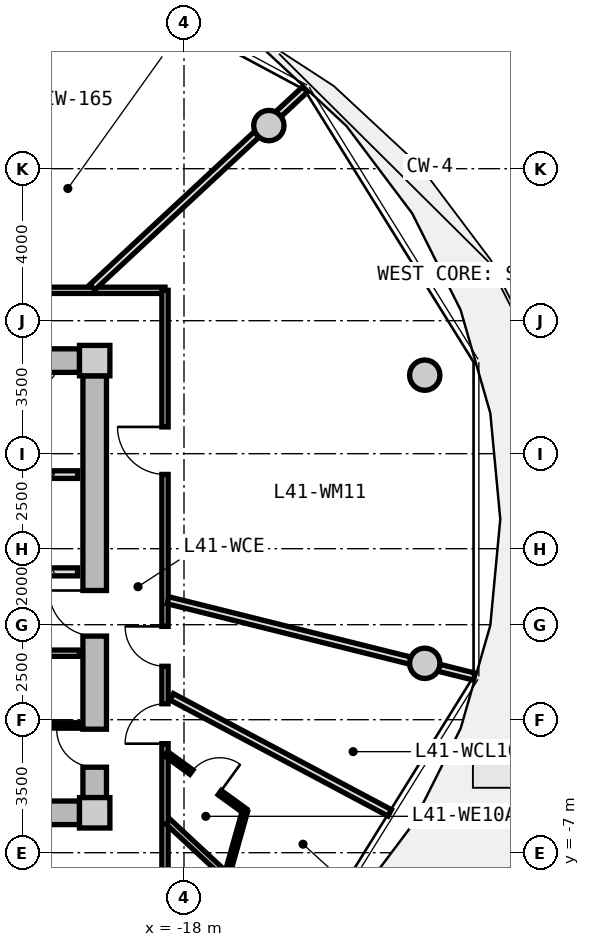
"""IFC4 building model, lengths in metres.
Left out: names, types, materials, properties, quantities, classifications, styles, units other than length and angle.
Written with IfcOpenShell. Run it as: python <this file> out.ifc"""

import sys

from ifc_helpers import new_model, si_unit, direction, frame, frame_2d, origin, origin_2d, place, context, subcontext, project, spatial, rectangle, circle, extrude, source, transform, mapped, element, fill, save


model = new_model("IFC4")
c1 = context("Model", 3, precision=1e-05, world=origin(), true_north=direction((0.0, 1.0)))
c2 = subcontext(c1, "Body", "Model", "MODEL_VIEW")
j1 = project(units=[si_unit("LENGTHUNIT", "METRE"), si_unit("PLANEANGLEUNIT", "RADIAN")], contexts=[c1])
p1 = place(None, origin())
s1 = spatial("IfcSite", under=j1, at=p1, CompositionType="ELEMENT")
p2 = place(p1, origin())
s2 = spatial("IfcBuilding", under=s1, at=p2, CompositionType="ELEMENT")
p3 = place(p2, frame((0.0, 0.0, 134.3)))
s3 = spatial("IfcBuildingStorey", under=s2, at=p3, CompositionType="ELEMENT", Elevation=134.3)
m1 = source(origin(), c2, "Body", "SweptSolid", [
    extrude(rectangle(XDim=0.8, YDim=0.8, at=origin_2d()), origin(), (0.0, 0.0, 1.0), 3.05),
])
for number, where, z_axis, x_axis in (
    (1, (-20.35, -5.95, 0.0), (0.0, 0.0, 1.0), (1.0, 0.0, 0.0)),
    (2, (-20.35, 5.95, 0.0), (0.0, 0.0, 1.0), (1.0, 0.0, 0.0)),
):
    element("IfcColumn", number, at=place(p3, frame(where, z_axis=z_axis, x_axis=x_axis)), inside=s3, PredefinedType="COLUMN", context=c2, shape_type="MappedRepresentation", body=[
        mapped(m1, transform((0.0, 0.0, 0.0), x_axis=(1.0, 0.0, 0.0), y_axis=(0.0, 1.0, 0.0), z_axis=(0.0, 0.0, 1.0), scale=1.0)),
    ])
m2 = source(origin(), c2, "Body", "SweptSolid", [
    extrude(rectangle(XDim=14.5, YDim=0.62, at=frame_2d((7.25, 0.0))), origin(), (0.0, 0.0, 1.0), 2.81),
])
for number, where, z_axis, x_axis in (
    (3, (-35.25, 5.95, 0.0), (0.0, 0.0, 1.0), (1.0, 0.0, 0.0)),
    (4, (-20.75, -5.95, 0.0), (0.0, 0.0, 1.0), (-1.0, 0.0, 0.0)),
):
    element("IfcWall", number, at=place(p3, frame(where, z_axis=z_axis, x_axis=x_axis)), inside=s3, PredefinedType="SHEAR", context=c2, shape_type="MappedRepresentation", body=[
        mapped(m2, transform((0.0, 0.0, 0.0), x_axis=(1.0, 0.0, 0.0), y_axis=(0.0, 1.0, 0.0), z_axis=(0.0, 0.0, 1.0), scale=1.0)),
    ])
m3 = source(origin(), c2, "Body", "SweptSolid", [
    extrude(rectangle(XDim=11.1, YDim=0.62, at=frame_2d((5.55, 0.0))), origin(), (0.0, 0.0, 1.0), 2.81),
])
p4 = place(p3, frame((-20.35, 5.55, 0.0), z_axis=(0.0, 0.0, 1.0), x_axis=(0.0, -1.0, 0.0)))
e5 = element("IfcWall", 5, at=p4, inside=s3, PredefinedType="SHEAR", context=c2, shape_type="MappedRepresentation", body=[
    mapped(m3, transform((0.0, 0.0, 0.0), x_axis=(1.0, 0.0, 0.0), y_axis=(0.0, 1.0, 0.0), z_axis=(0.0, 0.0, 1.0), scale=1.0)),
])
p5 = place(p4, frame((5.65, 0.0, 0.0)))
e6 = element("IfcOpeningElement", 6, at=p5, cuts=e5, PredefinedType="OPENING", context=c2, shape_type="SweptSolid", body=[
    extrude(rectangle(XDim=1.2, YDim=2.15, at=frame_2d((0.6, 1.075))), frame((0.0, 0.32, 0.0), z_axis=(0.0, -1.0, 0.0), x_axis=(1.0, 0.0, 0.0)), (0.0, 0.0, 1.0), 0.64),
])
p6 = place(p4, frame((9.3, 0.0, 0.0)))
e7 = element("IfcOpeningElement", 7, at=p6, cuts=e5, PredefinedType="OPENING", context=c2, shape_type="SweptSolid", body=[
    extrude(rectangle(XDim=1.0, YDim=2.1, at=frame_2d((0.5, 1.05))), frame((0.0, 0.32, 0.0), z_axis=(0.0, -1.0, 0.0), x_axis=(1.0, 0.0, 0.0)), (0.0, 0.0, 1.0), 0.64),
])
m4 = source(origin(), c2, "Body", "SweptSolid", [
    extrude(circle(Radius=0.4, at=origin_2d()), origin(), (0.0, 0.0, 1.0), 3.47),
])
for number, where, z_axis, x_axis in (
    (8, (-11.665, 5.567, -0.42), (0.0, 0.0, 1.0), (1.0, 0.0, 0.0)),
    (9, (-15.767, 12.135, -0.42), (0.0, 0.0, 1.0), (1.0, 0.0, 0.0)),
    (10, (-11.665, -2.016, -0.42), (0.0, 0.0, 1.0), (1.0, 0.0, 0.0)),
):
    element("IfcColumn", number, at=place(p3, frame(where, z_axis=z_axis, x_axis=x_axis)), inside=s3, PredefinedType="COLUMN", context=c2, shape_type="MappedRepresentation", body=[
        mapped(m4, transform((0.0, 0.0, 0.0), x_axis=(1.0, 0.0, 0.0), y_axis=(0.0, 1.0, 0.0), z_axis=(0.0, 0.0, 1.0), scale=1.0)),
    ])
m5 = source(origin(), c2, "Body", "SweptSolid", [
    extrude(rectangle(XDim=3.2, YDim=0.2, at=frame_2d((1.6, 0.0))), origin(), (0.0, 0.0, 1.0), 2.795),
])
p7 = place(p3, frame((-24.0, 2.95, 0.0), z_axis=(0.0, 0.0, 1.0), x_axis=(1.0, 0.0, 0.0)))
e11 = element("IfcWall", 11, at=p7, inside=s3, PredefinedType="PARTITIONING", context=c2, shape_type="MappedRepresentation", body=[
    mapped(m5, transform((0.0, 0.0, 0.0), x_axis=(1.0, 0.0, 0.0), y_axis=(0.0, 1.0, 0.0), z_axis=(0.0, 0.0, 1.0), scale=1.0)),
])
m6 = source(origin(), c2, "Body", "SweptSolid", [
    extrude(rectangle(XDim=6.66, YDim=0.21, at=frame_2d((3.33, 0.0))), origin(), (0.0, 0.0, 1.0), 2.795),
])
p8 = place(p3, frame((-27.46, 0.39, 0.0), z_axis=(0.0, 0.0, 1.0), x_axis=(1.0, 0.0, 0.0)))
e12 = element("IfcWall", 12, at=p8, inside=s3, PredefinedType="PARTITIONING", context=c2, shape_type="MappedRepresentation", body=[
    mapped(m6, transform((0.0, 0.0, 0.0), x_axis=(1.0, 0.0, 0.0), y_axis=(0.0, 1.0, 0.0), z_axis=(0.0, 0.0, 1.0), scale=1.0)),
])
p9 = place(p8, frame((1.0, 0.0, 0.0)))
e13 = element("IfcOpeningElement", 13, at=p9, cuts=e12, PredefinedType="OPENING", context=c2, shape_type="SweptSolid", body=[
    extrude(rectangle(XDim=1.2, YDim=2.15, at=frame_2d((0.6, 1.075))), frame((0.0, 0.115, 0.0), z_axis=(0.0, -1.0, 0.0), x_axis=(1.0, 0.0, 0.0)), (0.0, 0.0, 1.0), 0.23),
])
m7 = source(origin(), c2, "Body", "SweptSolid", [
    extrude(rectangle(XDim=2.7, YDim=0.165, at=frame_2d((1.35, 0.0))), origin(), (0.0, 0.0, 1.0), 2.795),
])
p10 = place(p3, frame((-23.45, -1.75, 0.0), z_axis=(0.0, 0.0, 1.0), x_axis=(1.0, 0.0, 0.0)))
e14 = element("IfcWall", 14, at=p10, inside=s3, PredefinedType="PARTITIONING", context=c2, shape_type="MappedRepresentation", body=[
    mapped(m7, transform((0.0, 0.0, 0.0), x_axis=(1.0, 0.0, 0.0), y_axis=(0.0, 1.0, 0.0), z_axis=(0.0, 0.0, 1.0), scale=1.0)),
])
p11 = place(p10, frame((0.85, 0.0, 0.0)))
e15 = element("IfcOpeningElement", 15, at=p11, cuts=e14, PredefinedType="OPENING", context=c2, shape_type="SweptSolid", body=[
    extrude(rectangle(XDim=0.925, YDim=2.1, at=frame_2d((0.462, 1.05))), frame((0.0, 0.093, 0.0), z_axis=(0.0, -1.0, 0.0), x_axis=(1.0, 0.0, 0.0)), (0.0, 0.0, 1.0), 0.185),
])
m8 = source(origin(), c2, "Body", "SweptSolid", [
    extrude(rectangle(XDim=2.7, YDim=0.14, at=frame_2d((1.35, 0.0))), origin(), (0.0, 0.0, 1.0), 2.795),
])
p12 = place(p3, frame((-23.45, -3.65, 0.0), z_axis=(0.0, 0.0, 1.0), x_axis=(1.0, 0.0, 0.0)))
e16 = element("IfcWall", 16, at=p12, inside=s3, PredefinedType="PARTITIONING", context=c2, shape_type="MappedRepresentation", body=[
    mapped(m8, transform((0.0, 0.0, 0.0), x_axis=(1.0, 0.0, 0.0), y_axis=(0.0, 1.0, 0.0), z_axis=(0.0, 0.0, 1.0), scale=1.0)),
])
m9 = source(origin(), c2, "Body", "SweptSolid", [
    extrude(rectangle(XDim=8.6, YDim=0.165, at=frame_2d((4.3, 0.0))), origin(), (0.0, 0.0, 1.0), 2.795),
])
p13 = place(p3, frame((-27.1, 7.8, 0.0), z_axis=(0.0, 0.0, 1.0), x_axis=(1.0, 0.0, 0.0)))
e17 = element("IfcWall", 17, at=p13, inside=s3, PredefinedType="PARTITIONING", context=c2, shape_type="MappedRepresentation", body=[
    mapped(m9, transform((0.0, 0.0, 0.0), x_axis=(1.0, 0.0, 0.0), y_axis=(0.0, 1.0, 0.0), z_axis=(0.0, 0.0, 1.0), scale=1.0)),
])
p14 = place(p13, frame((3.688, 0.0, 0.0)))
e18 = element("IfcOpeningElement", 18, at=p14, cuts=e17, PredefinedType="OPENING", context=c2, shape_type="SweptSolid", body=[
    extrude(rectangle(XDim=1.25, YDim=2.2, at=frame_2d((0.625, 1.1))), frame((0.0, 0.093, 0.0), z_axis=(0.0, -1.0, 0.0), x_axis=(1.0, 0.0, 0.0)), (0.0, 0.0, 1.0), 0.185),
])
m10 = source(origin(), c2, "Body", "SweptSolid", [
    extrude(rectangle(XDim=15.6, YDim=0.165, at=frame_2d((7.8, 0.0))), origin(), (0.0, 0.0, 1.0), 2.795),
])
p15 = place(p3, frame((-18.5, 7.8, 0.0), z_axis=(0.0, 0.0, 1.0), x_axis=(0.0, -1.0, 0.0)))
e19 = element("IfcWall", 19, at=p15, inside=s3, PredefinedType="PARTITIONING", context=c2, shape_type="MappedRepresentation", body=[
    mapped(m10, transform((0.0, 0.0, 0.0), x_axis=(1.0, 0.0, 0.0), y_axis=(0.0, 1.0, 0.0), z_axis=(0.0, 0.0, 1.0), scale=1.0)),
])
p16 = place(p15, frame((10.881, 0.0, 0.0)))
e20 = element("IfcOpeningElement", 20, at=p16, cuts=e19, PredefinedType="OPENING", context=c2, shape_type="SweptSolid", body=[
    extrude(rectangle(XDim=1.05, YDim=2.15, at=frame_2d((0.525, 1.075))), frame((0.0, 0.093, 0.0), z_axis=(0.0, -1.0, 0.0), x_axis=(1.0, 0.0, 0.0)), (0.0, 0.0, 1.0), 0.185),
])
p17 = place(p15, frame((8.844, 0.0, 0.0)))
e21 = element("IfcOpeningElement", 21, at=p17, cuts=e19, PredefinedType="OPENING", context=c2, shape_type="SweptSolid", body=[
    extrude(rectangle(XDim=1.05, YDim=2.15, at=frame_2d((0.525, 1.075))), frame((0.0, 0.093, 0.0), z_axis=(0.0, -1.0, 0.0), x_axis=(1.0, 0.0, 0.0)), (0.0, 0.0, 1.0), 0.185),
])
p18 = place(p15, frame((3.596, 0.0, 0.0)))
e22 = element("IfcOpeningElement", 22, at=p18, cuts=e19, PredefinedType="OPENING", context=c2, shape_type="SweptSolid", body=[
    extrude(rectangle(XDim=1.25, YDim=2.2, at=frame_2d((0.625, 1.1))), frame((0.0, 0.093, 0.0), z_axis=(0.0, -1.0, 0.0), x_axis=(1.0, 0.0, 0.0)), (0.0, 0.0, 1.0), 0.185),
])
m11 = source(origin(), c2, "Body", "SweptSolid", [
    extrude(rectangle(XDim=4.927, YDim=0.165, at=frame_2d((2.463, 0.0))), origin(), (0.0, 0.0, 1.0), 2.345),
])
p19 = place(p3, frame((-18.42, -6.183, 0.0), z_axis=(0.0, 0.0, 1.0), x_axis=(0.732191335987, -0.681098999783, 0.0)))
e23 = element("IfcWall", 23, at=p19, inside=s3, PredefinedType="PARTITIONING", context=c2, shape_type="MappedRepresentation", body=[
    mapped(m11, transform((0.0, 0.0, 0.0), x_axis=(1.0, 0.0, 0.0), y_axis=(0.0, 1.0, 0.0), z_axis=(0.0, 0.0, 1.0), scale=1.0)),
])
m12 = source(origin(), c2, "Body", "SweptSolid", [
    extrude(rectangle(XDim=8.305, YDim=0.19, at=frame_2d((4.153, 0.0))), origin(), (0.0, 0.0, 1.0), 2.345),
])
p20 = place(p3, frame((-18.42, -0.357, 0.0), z_axis=(0.0, 0.0, 1.0), x_axis=(0.970309994378, -0.241864662175, 0.0)))
e24 = element("IfcWall", 24, at=p20, inside=s3, PredefinedType="PARTITIONING", context=c2, shape_type="MappedRepresentation", body=[
    mapped(m12, transform((0.0, 0.0, 0.0), x_axis=(1.0, 0.0, 0.0), y_axis=(0.0, 1.0, 0.0), z_axis=(0.0, 0.0, 1.0), scale=1.0)),
])
m13 = source(origin(), c2, "Body", "SweptSolid", [
    extrude(rectangle(XDim=6.499, YDim=0.19, at=frame_2d((3.25, 0.0))), origin(), (0.0, 0.0, 1.0), 2.795),
])
p21 = place(p3, frame((-18.324, -2.898, 0.0), z_axis=(0.0, 0.0, 1.0), x_axis=(0.882700013711, -0.469936895545, 0.0)))
e25 = element("IfcWall", 25, at=p21, inside=s3, PredefinedType="PARTITIONING", context=c2, shape_type="MappedRepresentation", body=[
    mapped(m13, transform((0.0, 0.0, 0.0), x_axis=(1.0, 0.0, 0.0), y_axis=(0.0, 1.0, 0.0), z_axis=(0.0, 0.0, 1.0), scale=1.0)),
])
m14 = source(origin(), c2, "Body", "SweptSolid", [
    extrude(rectangle(XDim=2.563, YDim=0.14, at=frame_2d((1.282, 0.0))), origin(), (0.0, 0.0, 1.0), 2.795),
])
p22 = place(p3, frame((-18.47, -4.397, 0.0), z_axis=(0.0, 0.0, 1.0), x_axis=(0.809308208957, -0.587384220859, 0.0)))
e26 = element("IfcWall", 26, at=p22, inside=s3, PredefinedType="PARTITIONING", context=c2, shape_type="MappedRepresentation", body=[
    mapped(m14, transform((0.0, 0.0, 0.0), x_axis=(1.0, 0.0, 0.0), y_axis=(0.0, 1.0, 0.0), z_axis=(0.0, 0.0, 1.0), scale=1.0)),
])
p23 = place(p22, frame((0.822, 0.0, 0.0)))
e27 = element("IfcOpeningElement", 27, at=p23, cuts=e26, PredefinedType="OPENING", context=c2, shape_type="SweptSolid", body=[
    extrude(rectangle(XDim=0.92, YDim=2.1, at=frame_2d((0.46, 1.05))), frame((0.0, 0.08, 0.0), z_axis=(0.0, -1.0, 0.0), x_axis=(1.0, 0.0, 0.0)), (0.0, 0.0, 1.0), 0.16),
])
m15 = source(origin(), c2, "Body", "SweptSolid", [
    extrude(rectangle(XDim=1.826, YDim=0.14, at=frame_2d((0.913, 0.0))), origin(), (0.0, 0.0, 1.0), 2.435),
])
p24 = place(p3, frame((-16.396, -5.903, 0.0), z_axis=(0.0, 0.0, 1.0), x_axis=(-0.270745576918, -0.962650940154, 0.0)))
e28 = element("IfcWall", 28, at=p24, inside=s3, PredefinedType="PARTITIONING", context=c2, shape_type="MappedRepresentation", body=[
    mapped(m15, transform((0.0, 0.0, 0.0), x_axis=(1.0, 0.0, 0.0), y_axis=(0.0, 1.0, 0.0), z_axis=(0.0, 0.0, 1.0), scale=1.0)),
])
m16 = source(origin(), c2, "Body", "SweptSolid", [
    extrude(rectangle(XDim=7.648, YDim=0.19, at=frame_2d((3.824, 0.0))), origin(), (0.0, 0.0, 1.0), 2.345),
])
p25 = place(p3, frame((-20.413, 7.88, 0.0), z_axis=(0.0, 0.0, 1.0), x_axis=(0.732182665826, 0.681108320213, 0.0)))
e29 = element("IfcWall", 29, at=p25, inside=s3, PredefinedType="PARTITIONING", context=c2, shape_type="MappedRepresentation", body=[
    mapped(m16, transform((0.0, 0.0, 0.0), x_axis=(1.0, 0.0, 0.0), y_axis=(0.0, 1.0, 0.0), z_axis=(0.0, 0.0, 1.0), scale=1.0)),
])
m17 = source(origin(), c2, "Body", "SweptSolid", [
    extrude(rectangle(XDim=1.2, YDim=2.15, at=frame_2d((0.6, 1.075))), frame((0.0, 0.025, 0.0), z_axis=(0.0, -1.0, 0.0), x_axis=(1.0, 0.0, 0.0)), (0.0, 0.0, 1.0), 0.05),
])
p26 = place(p5, frame((1.2, 0.0, 0.0), z_axis=(0.0, 0.0, 1.0), x_axis=(-1.0, 0.0, 0.0)))
e30 = element("IfcDoor", 30, at=p26, inside=s3, OperationType="SINGLE_SWING_RIGHT", PredefinedType="DOOR", context=c2, shape_type="MappedRepresentation", body=[
    mapped(m17, transform((0.0, 0.0, 0.0), x_axis=(1.0, 0.0, 0.0), y_axis=(0.0, 1.0, 0.0), z_axis=(0.0, 0.0, 1.0), scale=1.0)),
])
fill(e6, e30)
m18 = source(origin(), c2, "Body", "SweptSolid", [
    extrude(rectangle(XDim=1.0, YDim=2.1, at=frame_2d((0.5, 1.05))), frame((0.0, 0.025, 0.0), z_axis=(0.0, -1.0, 0.0), x_axis=(1.0, 0.0, 0.0)), (0.0, 0.0, 1.0), 0.05),
])
p27 = place(p6, frame((1.0, 0.0, 0.0), z_axis=(0.0, 0.0, 1.0), x_axis=(-1.0, 0.0, 0.0)))
e31 = element("IfcDoor", 31, at=p27, inside=s3, OperationType="SINGLE_SWING_RIGHT", PredefinedType="DOOR", context=c2, shape_type="MappedRepresentation", body=[
    mapped(m18, transform((0.0, 0.0, 0.0), x_axis=(1.0, 0.0, 0.0), y_axis=(0.0, 1.0, 0.0), z_axis=(0.0, 0.0, 1.0), scale=1.0)),
])
fill(e7, e31)
m19 = source(origin(), c2, "Body", "SweptSolid", [
    extrude(rectangle(XDim=1.05, YDim=2.15, at=frame_2d((0.525, 1.075))), frame((0.0, 0.025, 0.0), z_axis=(0.0, -1.0, 0.0), x_axis=(1.0, 0.0, 0.0)), (0.0, 0.0, 1.0), 0.05),
])
p28 = place(p16, frame((1.05, 0.0, 0.0), z_axis=(0.0, 0.0, 1.0), x_axis=(-1.0, 0.0, 0.0)))
e32 = element("IfcDoor", 32, at=p28, inside=s3, OperationType="SINGLE_SWING_LEFT", PredefinedType="DOOR", context=c2, shape_type="MappedRepresentation", body=[
    mapped(m19, transform((0.0, 0.0, 0.0), x_axis=(1.0, 0.0, 0.0), y_axis=(0.0, 1.0, 0.0), z_axis=(0.0, 0.0, 1.0), scale=1.0)),
])
fill(e20, e32)
m20 = source(origin(), c2, "Body", "SweptSolid", [
    extrude(rectangle(XDim=0.92, YDim=2.1, at=frame_2d((0.46, 1.05))), frame((0.0, 0.025, 0.0), z_axis=(0.0, -1.0, 0.0), x_axis=(1.0, 0.0, 0.0)), (0.0, 0.0, 1.0), 0.05),
])
p29 = place(p23, origin())
e33 = element("IfcDoor", 33, at=p29, inside=s3, OperationType="SINGLE_SWING_RIGHT", PredefinedType="DOOR", context=c2, shape_type="MappedRepresentation", body=[
    mapped(m20, transform((0.0, 0.0, 0.0), x_axis=(1.0, 0.0, 0.0), y_axis=(0.0, 1.0, 0.0), z_axis=(0.0, 0.0, 1.0), scale=1.0)),
])
fill(e27, e33)
p30 = place(p17, frame((1.05, 0.0, 0.0), z_axis=(0.0, 0.0, 1.0), x_axis=(-1.0, 0.0, 0.0)))
e34 = element("IfcDoor", 34, at=p30, inside=s3, OperationType="SINGLE_SWING_RIGHT", PredefinedType="DOOR", context=c2, shape_type="MappedRepresentation", body=[
    mapped(m19, transform((0.0, 0.0, 0.0), x_axis=(1.0, 0.0, 0.0), y_axis=(0.0, 1.0, 0.0), z_axis=(0.0, 0.0, 1.0), scale=1.0)),
])
fill(e21, e34)
m21 = source(origin(), c2, "Body", "SweptSolid", [
    extrude(rectangle(XDim=1.25, YDim=2.2, at=frame_2d((0.625, 1.1))), frame((0.0, 0.025, 0.0), z_axis=(0.0, -1.0, 0.0), x_axis=(1.0, 0.0, 0.0)), (0.0, 0.0, 1.0), 0.05),
])
p31 = place(p18, frame((1.25, 0.0, 0.0), z_axis=(0.0, 0.0, 1.0), x_axis=(-1.0, 0.0, 0.0)))
e35 = element("IfcDoor", 35, at=p31, inside=s3, OperationType="SINGLE_SWING_RIGHT", PredefinedType="DOOR", context=c2, shape_type="MappedRepresentation", body=[
    mapped(m21, transform((0.0, 0.0, 0.0), x_axis=(1.0, 0.0, 0.0), y_axis=(0.0, 1.0, 0.0), z_axis=(0.0, 0.0, 1.0), scale=1.0)),
])
fill(e22, e35)
save(model, sys.argv[1])
